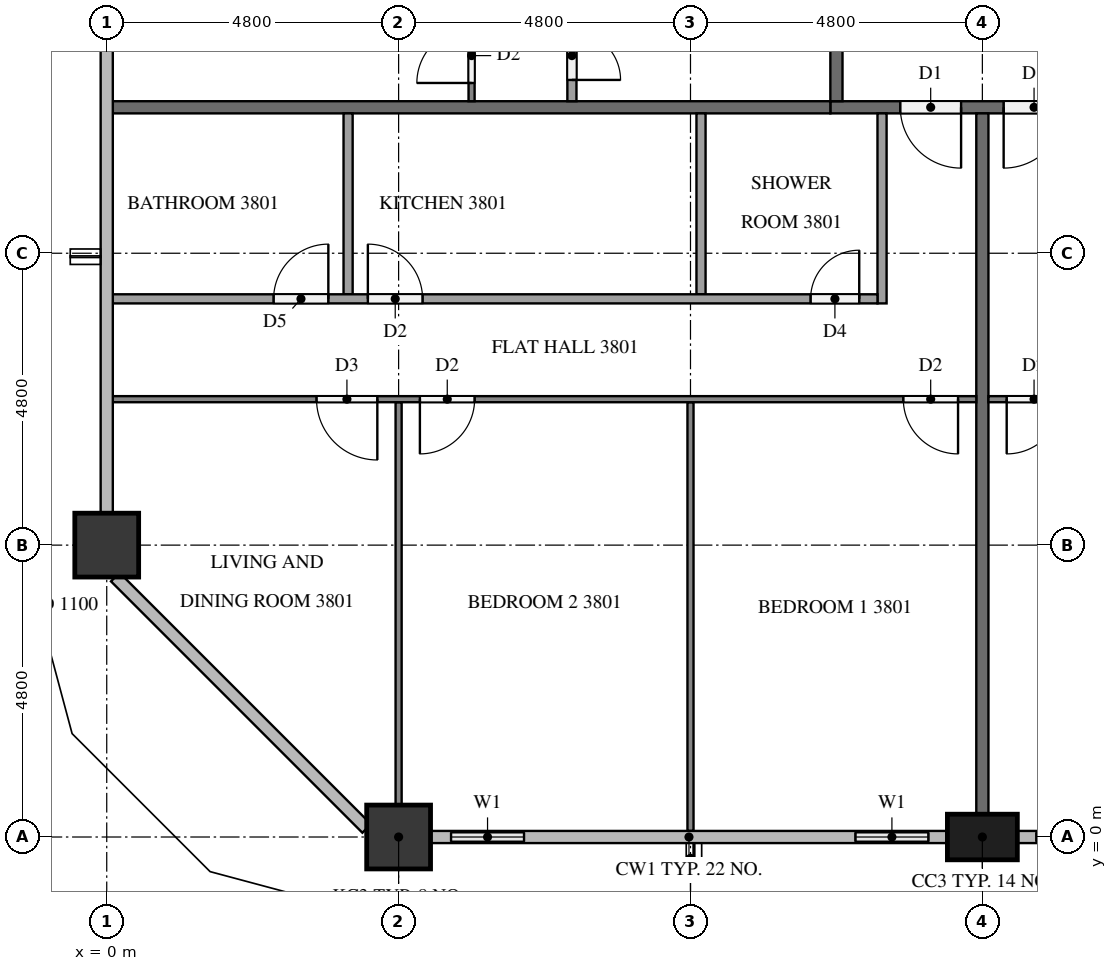
"""IFC4 building model, lengths in metres.
Left out: names, types, materials, properties, quantities, classifications, styles, units other than length and angle.
Written with IfcOpenShell. Run it as: python <this file> out.ifc"""

import sys

from ifc_helpers import new_model, si_unit, direction, frame, frame_2d, origin, origin_2d, place, context, subcontext, project, spatial, rectangle, extrude, element, fill, save


model = new_model("IFC4")
c1 = context("Model", 3, precision=1e-05, world=origin(), true_north=direction((0.0, 1.0)))
c2 = subcontext(c1, "Body", "Model", "MODEL_VIEW")
j1 = project(units=[si_unit("LENGTHUNIT", "METRE"), si_unit("PLANEANGLEUNIT", "RADIAN")], contexts=[c1])
p1 = place(None, origin())
s1 = spatial("IfcSite", under=j1, at=p1, CompositionType="ELEMENT")
p2 = place(p1, origin())
s2 = spatial("IfcBuilding", under=s1, at=p2, CompositionType="ELEMENT")
p3 = place(p2, frame((0.0, 0.0, 149.0)))
s3 = spatial("IfcBuildingStorey", under=s2, at=p3, CompositionType="ELEMENT", Elevation=149.0)
p4 = place(p3, frame((4.8, 0.0, 0.0), z_axis=(0.0, 0.0, 1.0), x_axis=(1.0, 0.0, 0.0)))
e1 = element("IfcColumn", 1, at=p4, inside=s3, PredefinedType="COLUMN", context=c2, shape_type="SweptSolid", body=[
    extrude(rectangle(XDim=1.05, YDim=1.05, at=origin_2d()), origin(), (0.0, 0.0, 1.0), 3.2),
])
p5 = place(p3, frame((14.4, 0.0, 0.0), z_axis=(0.0, 0.0, 1.0), x_axis=(1.0, 0.0, 0.0)))
e2 = element("IfcColumn", 2, at=p5, inside=s3, PredefinedType="COLUMN", context=c2, shape_type="SweptSolid", body=[
    extrude(rectangle(XDim=1.15, YDim=0.75, at=origin_2d()), origin(), (0.0, 0.0, 1.0), 3.2),
])
p6 = place(p3, frame((0.0, 4.8, 0.0), z_axis=(0.0, 0.0, 1.0), x_axis=(1.0, 0.0, 0.0)))
e3 = element("IfcColumn", 3, at=p6, inside=s3, PredefinedType="COLUMN", context=c2, shape_type="SweptSolid", body=[
    extrude(rectangle(XDim=1.05, YDim=1.05, at=origin_2d()), origin(), (0.0, 0.0, 1.0), 3.2),
])
p7 = place(p3, frame((5.325, 0.0, 0.0), z_axis=(0.0, 0.0, 1.0), x_axis=(1.0, 0.0, 0.0)))
e4 = element("IfcWall", 4, at=p7, inside=s3, PredefinedType="SOLIDWALL", context=c2, shape_type="SweptSolid", body=[
    extrude(rectangle(XDim=1.875, YDim=0.15, at=frame_2d((0.938, 0.0))), origin(), (0.0, 0.0, 1.0), 3.2),
])
p8 = place(p7, frame((0.337, 0.0, 0.9)))
e5 = element("IfcOpeningElement", 5, at=p8, cuts=e4, PredefinedType="OPENING", context=c2, shape_type="SweptSolid", body=[
    extrude(rectangle(XDim=1.2, YDim=1.4, at=frame_2d((0.6, 0.7))), frame((0.0, 0.085, 0.0), z_axis=(0.0, -1.0, 0.0), x_axis=(1.0, 0.0, 0.0)), (0.0, 0.0, 1.0), 0.17),
])
p9 = place(p3, frame((12.0, 0.0, 0.0), z_axis=(0.0, 0.0, 1.0), x_axis=(1.0, 0.0, 0.0)))
e6 = element("IfcWall", 6, at=p9, inside=s3, PredefinedType="SOLIDWALL", context=c2, shape_type="SweptSolid", body=[
    extrude(rectangle(XDim=1.825, YDim=0.15, at=frame_2d((0.913, 0.0))), origin(), (0.0, 0.0, 1.0), 3.2),
])
p10 = place(p9, frame((0.312, 0.0, 0.9)))
e7 = element("IfcOpeningElement", 7, at=p10, cuts=e6, PredefinedType="OPENING", context=c2, shape_type="SweptSolid", body=[
    extrude(rectangle(XDim=1.2, YDim=1.4, at=frame_2d((0.6, 0.7))), frame((0.0, 0.085, 0.0), z_axis=(0.0, -1.0, 0.0), x_axis=(1.0, 0.0, 0.0)), (0.0, 0.0, 1.0), 0.17),
])
p11 = place(p3, frame((14.975, 0.0, 0.0), z_axis=(0.0, 0.0, 1.0), x_axis=(1.0, 0.0, 0.0)))
e8 = element("IfcWall", 8, at=p11, inside=s3, PredefinedType="SOLIDWALL", context=c2, shape_type="SweptSolid", body=[
    extrude(rectangle(XDim=1.825, YDim=0.15, at=frame_2d((0.913, 0.0))), origin(), (0.0, 0.0, 1.0), 3.2),
])
p12 = place(p11, frame((0.312, 0.0, 0.9)))
e9 = element("IfcOpeningElement", 9, at=p12, cuts=e8, PredefinedType="OPENING", context=c2, shape_type="SweptSolid", body=[
    extrude(rectangle(XDim=1.2, YDim=1.4, at=frame_2d((0.6, 0.7))), frame((0.0, 0.085, 0.0), z_axis=(0.0, -1.0, 0.0), x_axis=(1.0, 0.0, 0.0)), (0.0, 0.0, 1.0), 0.17),
])
p13 = place(p3, frame((50.5, 12.0, 0.0), z_axis=(0.0, 0.0, 1.0), x_axis=(-1.0, 0.0, 0.0)))
e10 = element("IfcWall", 10, at=p13, inside=s3, PredefinedType="PARTITIONING", context=c2, shape_type="SweptSolid", body=[
    extrude(rectangle(XDim=38.6, YDim=0.2, at=frame_2d((19.3, 0.0))), origin(), (0.0, 0.0, 1.0), 3.2),
])
p14 = place(p13, frame((36.45, 0.0, 0.0)))
e11 = element("IfcOpeningElement", 11, at=p14, cuts=e10, PredefinedType="OPENING", context=c2, shape_type="SweptSolid", body=[
    extrude(rectangle(XDim=1.0, YDim=2.1, at=frame_2d((0.5, 1.05))), frame((0.0, 0.11, 0.0), z_axis=(0.0, -1.0, 0.0), x_axis=(1.0, 0.0, 0.0)), (0.0, 0.0, 1.0), 0.22),
])
p15 = place(p13, frame((34.75, 0.0, 0.0)))
e12 = element("IfcOpeningElement", 12, at=p15, cuts=e10, PredefinedType="OPENING", context=c2, shape_type="SweptSolid", body=[
    extrude(rectangle(XDim=1.0, YDim=2.1, at=frame_2d((0.5, 1.05))), frame((0.0, 0.11, 0.0), z_axis=(0.0, -1.0, 0.0), x_axis=(1.0, 0.0, 0.0)), (0.0, 0.0, 1.0), 0.22),
])
p16 = place(p13, frame((10.05, 0.0, 0.0)))
e13 = element("IfcOpeningElement", 13, at=p16, cuts=e10, PredefinedType="OPENING", context=c2, shape_type="SweptSolid", body=[
    extrude(rectangle(XDim=1.0, YDim=2.1, at=frame_2d((0.5, 1.05))), frame((0.0, 0.11, 0.0), z_axis=(0.0, -1.0, 0.0), x_axis=(1.0, 0.0, 0.0)), (0.0, 0.0, 1.0), 0.22),
])
p17 = place(p13, frame((8.35, 0.0, 0.0)))
e14 = element("IfcOpeningElement", 14, at=p17, cuts=e10, PredefinedType="OPENING", context=c2, shape_type="SweptSolid", body=[
    extrude(rectangle(XDim=1.0, YDim=2.1, at=frame_2d((0.5, 1.05))), frame((0.0, 0.11, 0.0), z_axis=(0.0, -1.0, 0.0), x_axis=(1.0, 0.0, 0.0)), (0.0, 0.0, 1.0), 0.22),
])
p18 = place(p3, frame((12.0, 12.1, 0.0), z_axis=(0.0, 0.0, 1.0), x_axis=(0.0, 1.0, 0.0)))
e15 = element("IfcWall", 15, at=p18, inside=s3, PredefinedType="PARTITIONING", context=c2, shape_type="SweptSolid", body=[
    extrude(rectangle(XDim=28.6, YDim=0.2, at=frame_2d((14.3, 0.0))), origin(), (0.0, 0.0, 1.0), 3.2),
])
p19 = place(p18, frame((27.35, 0.0, 0.0)))
e16 = element("IfcOpeningElement", 16, at=p19, cuts=e15, PredefinedType="OPENING", context=c2, shape_type="SweptSolid", body=[
    extrude(rectangle(XDim=1.0, YDim=2.1, at=frame_2d((0.5, 1.05))), frame((0.0, 0.11, 0.0), z_axis=(0.0, -1.0, 0.0), x_axis=(1.0, 0.0, 0.0)), (0.0, 0.0, 1.0), 0.22),
])
p20 = place(p18, frame((20.15, 0.0, 0.0)))
e17 = element("IfcOpeningElement", 17, at=p20, cuts=e15, PredefinedType="OPENING", context=c2, shape_type="SweptSolid", body=[
    extrude(rectangle(XDim=1.0, YDim=2.1, at=frame_2d((0.5, 1.05))), frame((0.0, 0.11, 0.0), z_axis=(0.0, -1.0, 0.0), x_axis=(1.0, 0.0, 0.0)), (0.0, 0.0, 1.0), 0.22),
])
p21 = place(p18, frame((10.55, 0.0, 0.0)))
e18 = element("IfcOpeningElement", 18, at=p21, cuts=e15, PredefinedType="OPENING", context=c2, shape_type="SweptSolid", body=[
    extrude(rectangle(XDim=1.0, YDim=2.1, at=frame_2d((0.5, 1.05))), frame((0.0, 0.11, 0.0), z_axis=(0.0, -1.0, 0.0), x_axis=(1.0, 0.0, 0.0)), (0.0, 0.0, 1.0), 0.22),
])
p22 = place(p3, frame((14.4, 11.9, 0.0), z_axis=(0.0, 0.0, 1.0), x_axis=(0.0, -1.0, 0.0)))
e19 = element("IfcWall", 19, at=p22, inside=s3, PredefinedType="PARTITIONING", context=c2, shape_type="SweptSolid", body=[
    extrude(rectangle(XDim=11.525, YDim=0.2, at=frame_2d((5.762, 0.0))), origin(), (0.0, 0.0, 1.0), 3.2),
])
p23 = place(p3, frame((0.1, 12.0, 0.0), z_axis=(0.0, 0.0, 1.0), x_axis=(1.0, 0.0, 0.0)))
e20 = element("IfcWall", 20, at=p23, inside=s3, PredefinedType="PARTITIONING", context=c2, shape_type="SweptSolid", body=[
    extrude(rectangle(XDim=11.8, YDim=0.2, at=frame_2d((5.9, 0.0))), origin(), (0.0, 0.0, 1.0), 3.2),
])
p24 = place(p3, frame((9.6, 7.15, 0.0), z_axis=(0.0, 0.0, 1.0), x_axis=(0.0, -1.0, 0.0)))
e21 = element("IfcWall", 21, at=p24, inside=s3, PredefinedType="PARTITIONING", context=c2, shape_type="SweptSolid", body=[
    extrude(rectangle(XDim=7.05, YDim=0.1, at=frame_2d((3.525, 0.0))), origin(), (0.0, 0.0, 1.0), 3.2),
])
p25 = place(p3, frame((4.8, 7.15, 0.0), z_axis=(0.0, 0.0, 1.0), x_axis=(0.0, -1.0, 0.0)))
e22 = element("IfcWall", 22, at=p25, inside=s3, PredefinedType="PARTITIONING", context=c2, shape_type="SweptSolid", body=[
    extrude(rectangle(XDim=6.625, YDim=0.1, at=frame_2d((3.312, 0.0))), origin(), (0.0, 0.0, 1.0), 3.2),
])
p26 = place(p3, frame((14.3, 7.2, 0.0), z_axis=(0.0, 0.0, 1.0), x_axis=(-1.0, 0.0, 0.0)))
e23 = element("IfcWall", 23, at=p26, inside=s3, PredefinedType="PARTITIONING", context=c2, shape_type="SweptSolid", body=[
    extrude(rectangle(XDim=14.2, YDim=0.1, at=frame_2d((7.1, 0.0))), origin(), (0.0, 0.0, 1.0), 3.2),
])
p27 = place(p26, frame((0.3, 0.0, 0.0)))
e24 = element("IfcOpeningElement", 24, at=p27, cuts=e23, PredefinedType="OPENING", context=c2, shape_type="SweptSolid", body=[
    extrude(rectangle(XDim=0.9, YDim=2.1, at=frame_2d((0.45, 1.05))), frame((0.0, 0.06, 0.0), z_axis=(0.0, -1.0, 0.0), x_axis=(1.0, 0.0, 0.0)), (0.0, 0.0, 1.0), 0.12),
])
p28 = place(p26, frame((8.25, 0.0, 0.0)))
e25 = element("IfcOpeningElement", 25, at=p28, cuts=e23, PredefinedType="OPENING", context=c2, shape_type="SweptSolid", body=[
    extrude(rectangle(XDim=0.9, YDim=2.1, at=frame_2d((0.45, 1.05))), frame((0.0, 0.06, 0.0), z_axis=(0.0, -1.0, 0.0), x_axis=(1.0, 0.0, 0.0)), (0.0, 0.0, 1.0), 0.12),
])
p29 = place(p26, frame((9.85, 0.0, 0.0)))
e26 = element("IfcOpeningElement", 26, at=p29, cuts=e23, PredefinedType="OPENING", context=c2, shape_type="SweptSolid", body=[
    extrude(rectangle(XDim=1.0, YDim=2.1, at=frame_2d((0.5, 1.05))), frame((0.0, 0.06, 0.0), z_axis=(0.0, -1.0, 0.0), x_axis=(1.0, 0.0, 0.0)), (0.0, 0.0, 1.0), 0.12),
])
for number, where, z_axis, x_axis in (
    (27, (9.773, 11.9, 0.0), (0.0, 0.0, 1.0), (0.0, -1.0, 0.0)),
    (28, (3.969, 11.9, 0.0), (0.0, 0.0, 1.0), (0.0, -1.0, 0.0)),
):
    element("IfcWall", number, at=place(p3, frame(where, z_axis=z_axis, x_axis=x_axis)), inside=s3, PredefinedType="PARTITIONING", context=c2, shape_type="SweptSolid", body=[
        extrude(rectangle(XDim=2.975, YDim=0.15, at=frame_2d((1.487, 0.0))), origin(), (0.0, 0.0, 1.0), 3.2),
    ])
p30 = place(p3, frame((12.75, 11.9, 0.0), z_axis=(0.0, 0.0, 1.0), x_axis=(0.0, -1.0, 0.0)))
e29 = element("IfcWall", 29, at=p30, inside=s3, PredefinedType="PARTITIONING", context=c2, shape_type="SweptSolid", body=[
    extrude(rectangle(XDim=3.125, YDim=0.15, at=frame_2d((1.562, 0.0))), origin(), (0.0, 0.0, 1.0), 3.2),
])
p31 = place(p3, frame((0.1, 8.85, 0.0), z_axis=(0.0, 0.0, 1.0), x_axis=(1.0, 0.0, 0.0)))
e30 = element("IfcWall", 30, at=p31, inside=s3, PredefinedType="PARTITIONING", context=c2, shape_type="SweptSolid", body=[
    extrude(rectangle(XDim=12.575, YDim=0.15, at=frame_2d((6.288, 0.0))), origin(), (0.0, 0.0, 1.0), 3.2),
])
p32 = place(p31, frame((11.475, 0.0, 0.0)))
e31 = element("IfcOpeningElement", 31, at=p32, cuts=e30, PredefinedType="OPENING", context=c2, shape_type="SweptSolid", body=[
    extrude(rectangle(XDim=0.8, YDim=2.1, at=frame_2d((0.4, 1.05))), frame((0.0, 0.085, 0.0), z_axis=(0.0, -1.0, 0.0), x_axis=(1.0, 0.0, 0.0)), (0.0, 0.0, 1.0), 0.17),
])
p33 = place(p31, frame((4.194, 0.0, 0.0)))
e32 = element("IfcOpeningElement", 32, at=p33, cuts=e30, PredefinedType="OPENING", context=c2, shape_type="SweptSolid", body=[
    extrude(rectangle(XDim=0.9, YDim=2.1, at=frame_2d((0.45, 1.05))), frame((0.0, 0.085, 0.0), z_axis=(0.0, -1.0, 0.0), x_axis=(1.0, 0.0, 0.0)), (0.0, 0.0, 1.0), 0.17),
])
p34 = place(p31, frame((2.644, 0.0, 0.0)))
e33 = element("IfcOpeningElement", 33, at=p34, cuts=e30, PredefinedType="OPENING", context=c2, shape_type="SweptSolid", body=[
    extrude(rectangle(XDim=0.9, YDim=2.1, at=frame_2d((0.45, 1.05))), frame((0.0, 0.085, 0.0), z_axis=(0.0, -1.0, 0.0), x_axis=(1.0, 0.0, 0.0)), (0.0, 0.0, 1.0), 0.17),
])
p35 = place(p3, frame((26.3, 7.2, 0.0), z_axis=(0.0, 0.0, 1.0), x_axis=(-1.0, 0.0, 0.0)))
e34 = element("IfcWall", 34, at=p35, inside=s3, PredefinedType="PARTITIONING", context=c2, shape_type="SweptSolid", body=[
    extrude(rectangle(XDim=11.8, YDim=0.1, at=frame_2d((5.9, 0.0))), origin(), (0.0, 0.0, 1.0), 3.2),
])
p36 = place(p35, frame((10.6, 0.0, 0.0)))
e35 = element("IfcOpeningElement", 35, at=p36, cuts=e34, PredefinedType="OPENING", context=c2, shape_type="SweptSolid", body=[
    extrude(rectangle(XDim=0.9, YDim=2.1, at=frame_2d((0.45, 1.05))), frame((0.0, 0.06, 0.0), z_axis=(0.0, -1.0, 0.0), x_axis=(1.0, 0.0, 0.0)), (0.0, 0.0, 1.0), 0.12),
])
p37 = place(p35, frame((0.3, 0.0, 0.0)))
e36 = element("IfcOpeningElement", 36, at=p37, cuts=e34, PredefinedType="OPENING", context=c2, shape_type="SweptSolid", body=[
    extrude(rectangle(XDim=1.0, YDim=2.1, at=frame_2d((0.5, 1.05))), frame((0.0, 0.06, 0.0), z_axis=(0.0, -1.0, 0.0), x_axis=(1.0, 0.0, 0.0)), (0.0, 0.0, 1.0), 0.12),
])
p38 = place(p3, frame((6.0, 12.1, 0.0), z_axis=(0.0, 0.0, 1.0), x_axis=(0.0, 1.0, 0.0)))
e37 = element("IfcWall", 37, at=p38, inside=s3, PredefinedType="PARTITIONING", context=c2, shape_type="SweptSolid", body=[
    extrude(rectangle(XDim=11.8, YDim=0.1, at=frame_2d((5.9, 0.0))), origin(), (0.0, 0.0, 1.0), 3.2),
])
p39 = place(p38, frame((10.5, 0.0, 0.0)))
e38 = element("IfcOpeningElement", 38, at=p39, cuts=e37, PredefinedType="OPENING", context=c2, shape_type="SweptSolid", body=[
    extrude(rectangle(XDim=1.0, YDim=2.1, at=frame_2d((0.5, 1.05))), frame((0.0, 0.06, 0.0), z_axis=(0.0, -1.0, 0.0), x_axis=(1.0, 0.0, 0.0)), (0.0, 0.0, 1.0), 0.12),
])
p40 = place(p38, frame((0.3, 0.0, 0.0)))
e39 = element("IfcOpeningElement", 39, at=p40, cuts=e37, PredefinedType="OPENING", context=c2, shape_type="SweptSolid", body=[
    extrude(rectangle(XDim=0.9, YDim=2.1, at=frame_2d((0.45, 1.05))), frame((0.0, 0.06, 0.0), z_axis=(0.0, -1.0, 0.0), x_axis=(1.0, 0.0, 0.0)), (0.0, 0.0, 1.0), 0.12),
])
p41 = place(p3, frame((7.65, 22.275, 0.0), z_axis=(0.0, 0.0, 1.0), x_axis=(0.0, -1.0, 0.0)))
e40 = element("IfcWall", 40, at=p41, inside=s3, PredefinedType="PARTITIONING", context=c2, shape_type="SweptSolid", body=[
    extrude(rectangle(XDim=10.175, YDim=0.15, at=frame_2d((5.087, 0.0))), origin(), (0.0, 0.0, 1.0), 3.2),
])
p42 = place(p41, frame((0.3, 0.0, 0.0)))
e41 = element("IfcOpeningElement", 41, at=p42, cuts=e40, PredefinedType="OPENING", context=c2, shape_type="SweptSolid", body=[
    extrude(rectangle(XDim=0.9, YDim=2.1, at=frame_2d((0.45, 1.05))), frame((0.0, 0.085, 0.0), z_axis=(0.0, -1.0, 0.0), x_axis=(1.0, 0.0, 0.0)), (0.0, 0.0, 1.0), 0.17),
])
p43 = place(p41, frame((9.025, 0.0, 0.0)))
e42 = element("IfcOpeningElement", 42, at=p43, cuts=e40, PredefinedType="OPENING", context=c2, shape_type="SweptSolid", body=[
    extrude(rectangle(XDim=0.8, YDim=2.1, at=frame_2d((0.4, 1.05))), frame((0.0, 0.085, 0.0), z_axis=(0.0, -1.0, 0.0), x_axis=(1.0, 0.0, 0.0)), (0.0, 0.0, 1.0), 0.17),
])
p44 = place(p8, origin())
e43 = element("IfcWindow", 43, at=p44, inside=s3, PartitioningType="SINGLE_PANEL", PredefinedType="WINDOW", context=c2, shape_type="SweptSolid", body=[
    extrude(rectangle(XDim=1.2, YDim=1.4, at=frame_2d((0.6, 0.7))), frame((0.0, 0.03, 0.0), z_axis=(0.0, -1.0, 0.0), x_axis=(1.0, 0.0, 0.0)), (0.0, 0.0, 1.0), 0.06),
])
fill(e5, e43)
p45 = place(p10, origin())
e44 = element("IfcWindow", 44, at=p45, inside=s3, PartitioningType="SINGLE_PANEL", PredefinedType="WINDOW", context=c2, shape_type="SweptSolid", body=[
    extrude(rectangle(XDim=1.2, YDim=1.4, at=frame_2d((0.6, 0.7))), frame((0.0, 0.03, 0.0), z_axis=(0.0, -1.0, 0.0), x_axis=(1.0, 0.0, 0.0)), (0.0, 0.0, 1.0), 0.06),
])
fill(e7, e44)
p46 = place(p12, origin())
e45 = element("IfcWindow", 45, at=p46, inside=s3, PartitioningType="SINGLE_PANEL", PredefinedType="WINDOW", context=c2, shape_type="SweptSolid", body=[
    extrude(rectangle(XDim=1.2, YDim=1.4, at=frame_2d((0.6, 0.7))), frame((0.0, 0.03, 0.0), z_axis=(0.0, -1.0, 0.0), x_axis=(1.0, 0.0, 0.0)), (0.0, 0.0, 1.0), 0.06),
])
fill(e9, e45)
p47 = place(p14, origin())
e46 = element("IfcDoor", 46, at=p47, inside=s3, OperationType="SINGLE_SWING_LEFT", PredefinedType="DOOR", context=c2, shape_type="SweptSolid", body=[
    extrude(rectangle(XDim=1.0, YDim=2.1, at=frame_2d((0.5, 1.05))), frame((0.0, 0.025, 0.0), z_axis=(0.0, -1.0, 0.0), x_axis=(1.0, 0.0, 0.0)), (0.0, 0.0, 1.0), 0.05),
])
fill(e11, e46)
p48 = place(p15, origin())
e47 = element("IfcDoor", 47, at=p48, inside=s3, OperationType="SINGLE_SWING_RIGHT", PredefinedType="DOOR", context=c2, shape_type="SweptSolid", body=[
    extrude(rectangle(XDim=1.0, YDim=2.1, at=frame_2d((0.5, 1.05))), frame((0.0, 0.025, 0.0), z_axis=(0.0, -1.0, 0.0), x_axis=(1.0, 0.0, 0.0)), (0.0, 0.0, 1.0), 0.05),
])
fill(e12, e47)
p49 = place(p27, origin())
e48 = element("IfcDoor", 48, at=p49, inside=s3, OperationType="SINGLE_SWING_LEFT", PredefinedType="DOOR", context=c2, shape_type="SweptSolid", body=[
    extrude(rectangle(XDim=0.9, YDim=2.1, at=frame_2d((0.45, 1.05))), frame((0.0, 0.025, 0.0), z_axis=(0.0, -1.0, 0.0), x_axis=(1.0, 0.0, 0.0)), (0.0, 0.0, 1.0), 0.05),
])
fill(e24, e48)
p50 = place(p28, origin())
e49 = element("IfcDoor", 49, at=p50, inside=s3, OperationType="SINGLE_SWING_RIGHT", PredefinedType="DOOR", context=c2, shape_type="SweptSolid", body=[
    extrude(rectangle(XDim=0.9, YDim=2.1, at=frame_2d((0.45, 1.05))), frame((0.0, 0.025, 0.0), z_axis=(0.0, -1.0, 0.0), x_axis=(1.0, 0.0, 0.0)), (0.0, 0.0, 1.0), 0.05),
])
fill(e25, e49)
p51 = place(p29, origin())
e50 = element("IfcDoor", 50, at=p51, inside=s3, OperationType="SINGLE_SWING_LEFT", PredefinedType="DOOR", context=c2, shape_type="SweptSolid", body=[
    extrude(rectangle(XDim=1.0, YDim=2.1, at=frame_2d((0.5, 1.05))), frame((0.0, 0.025, 0.0), z_axis=(0.0, -1.0, 0.0), x_axis=(1.0, 0.0, 0.0)), (0.0, 0.0, 1.0), 0.05),
])
fill(e26, e50)
p52 = place(p32, origin())
e51 = element("IfcDoor", 51, at=p52, inside=s3, OperationType="SINGLE_SWING_RIGHT", PredefinedType="DOOR", context=c2, shape_type="SweptSolid", body=[
    extrude(rectangle(XDim=0.8, YDim=2.1, at=frame_2d((0.4, 1.05))), frame((0.0, 0.025, 0.0), z_axis=(0.0, -1.0, 0.0), x_axis=(1.0, 0.0, 0.0)), (0.0, 0.0, 1.0), 0.05),
])
fill(e31, e51)
p53 = place(p33, origin())
e52 = element("IfcDoor", 52, at=p53, inside=s3, OperationType="SINGLE_SWING_LEFT", PredefinedType="DOOR", context=c2, shape_type="SweptSolid", body=[
    extrude(rectangle(XDim=0.9, YDim=2.1, at=frame_2d((0.45, 1.05))), frame((0.0, 0.025, 0.0), z_axis=(0.0, -1.0, 0.0), x_axis=(1.0, 0.0, 0.0)), (0.0, 0.0, 1.0), 0.05),
])
fill(e32, e52)
p54 = place(p34, origin())
e53 = element("IfcDoor", 53, at=p54, inside=s3, OperationType="SINGLE_SWING_RIGHT", PredefinedType="DOOR", context=c2, shape_type="SweptSolid", body=[
    extrude(rectangle(XDim=0.9, YDim=2.1, at=frame_2d((0.45, 1.05))), frame((0.0, 0.025, 0.0), z_axis=(0.0, -1.0, 0.0), x_axis=(1.0, 0.0, 0.0)), (0.0, 0.0, 1.0), 0.05),
])
fill(e33, e53)
p55 = place(p36, origin())
e54 = element("IfcDoor", 54, at=p55, inside=s3, OperationType="SINGLE_SWING_RIGHT", PredefinedType="DOOR", context=c2, shape_type="SweptSolid", body=[
    extrude(rectangle(XDim=0.9, YDim=2.1, at=frame_2d((0.45, 1.05))), frame((0.0, 0.025, 0.0), z_axis=(0.0, -1.0, 0.0), x_axis=(1.0, 0.0, 0.0)), (0.0, 0.0, 1.0), 0.05),
])
fill(e35, e54)
p56 = place(p40, origin())
e55 = element("IfcDoor", 55, at=p56, inside=s3, OperationType="SINGLE_SWING_LEFT", PredefinedType="DOOR", context=c2, shape_type="SweptSolid", body=[
    extrude(rectangle(XDim=0.9, YDim=2.1, at=frame_2d((0.45, 1.05))), frame((0.0, 0.025, 0.0), z_axis=(0.0, -1.0, 0.0), x_axis=(1.0, 0.0, 0.0)), (0.0, 0.0, 1.0), 0.05),
])
fill(e39, e55)
p57 = place(p43, origin())
e56 = element("IfcDoor", 56, at=p57, inside=s3, OperationType="SINGLE_SWING_RIGHT", PredefinedType="DOOR", context=c2, shape_type="SweptSolid", body=[
    extrude(rectangle(XDim=0.8, YDim=2.1, at=frame_2d((0.4, 1.05))), frame((0.0, 0.025, 0.0), z_axis=(0.0, -1.0, 0.0), x_axis=(1.0, 0.0, 0.0)), (0.0, 0.0, 1.0), 0.05),
])
fill(e42, e56)
save(model, sys.argv[1])
